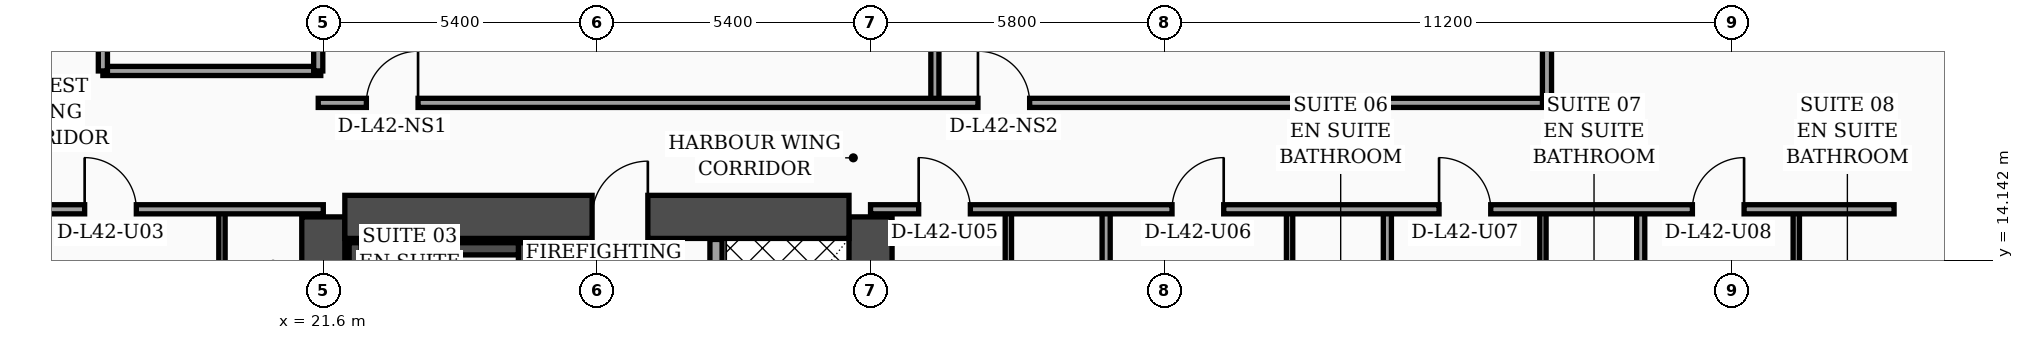
"""IFC4 building model, lengths in metres.
Left out: names, types, materials, properties, quantities, classifications, styles, units other than length and angle.
Written with IfcOpenShell. Run it as: python <this file> out.ifc"""

import sys

from ifc_helpers import new_model, si_unit, direction, frame, frame_2d, origin, place, context, subcontext, project, spatial, rectangle, extrude, element, fill, save


model = new_model("IFC4")
c1 = context("Model", 3, precision=1e-05, world=origin(), true_north=direction((0.0, 1.0)))
c2 = subcontext(c1, "Body", "Model", "MODEL_VIEW")
j1 = project(units=[si_unit("LENGTHUNIT", "METRE"), si_unit("PLANEANGLEUNIT", "RADIAN")], contexts=[c1])
p1 = place(None, origin())
s1 = spatial("IfcSite", under=j1, at=p1, CompositionType="ELEMENT")
p2 = place(p1, origin())
s2 = spatial("IfcBuilding", under=s1, at=p2, CompositionType="ELEMENT")
p3 = place(p2, frame((0.0, 0.0, 171.3)))
s3 = spatial("IfcBuildingStorey", under=s2, at=p3, CompositionType="ELEMENT", Elevation=171.3)
for number, where, z_axis, x_axis in (
    (1, (21.6, 4.6, 0.0), (0.0, 0.0, 1.0), (0.0, 1.0, 0.0)),
    (2, (32.4, 4.6, 0.0), (0.0, 0.0, 1.0), (0.0, 1.0, 0.0)),
):
    element("IfcWall", number, at=place(p3, frame(where, z_axis=z_axis, x_axis=x_axis)), inside=s3, PredefinedType="SHEAR", context=c2, shape_type="SweptSolid", body=[
        extrude(rectangle(XDim=10.4, YDim=0.85, at=frame_2d((5.2, 0.0))), origin(), (0.0, 0.0, 1.0), 3.56),
    ])
p4 = place(p3, frame((22.025, 15.0, 0.0), z_axis=(0.0, 0.0, 1.0), x_axis=(1.0, 0.0, 0.0)))
e3 = element("IfcWall", 3, at=p4, inside=s3, PredefinedType="SHEAR", context=c2, shape_type="SweptSolid", body=[
    extrude(rectangle(XDim=9.95, YDim=0.85, at=frame_2d((4.975, 0.0))), origin(), (0.0, 0.0, 1.0), 3.56),
])
p5 = place(p4, frame((4.88, 0.0, 0.0)))
e4 = element("IfcOpeningElement", 4, at=p5, cuts=e3, PredefinedType="OPENING", context=c2, shape_type="SweptSolid", body=[
    extrude(rectangle(XDim=1.1, YDim=2.2, at=frame_2d((0.55, 1.1))), frame((0.0, 0.435, 0.0), z_axis=(0.0, -1.0, 0.0), x_axis=(1.0, 0.0, 0.0)), (0.0, 0.0, 1.0), 0.87),
])
p6 = place(p3, frame((22.23, 5.025, 0.0), z_axis=(0.0, 0.0, 1.0), x_axis=(0.0, 1.0, 0.0)))
e5 = element("IfcWall", 5, at=p6, inside=s3, PredefinedType="SOLIDWALL", context=c2, shape_type="SweptSolid", body=[
    extrude(rectangle(XDim=9.465, YDim=0.24, at=frame_2d((4.732, 0.0))), origin(), (0.0, 0.0, 1.0), 3.56),
])
p7 = place(p3, frame((25.57, 5.025, 0.0), z_axis=(0.0, 0.0, 1.0), x_axis=(0.0, 1.0, 0.0)))
e6 = element("IfcWall", 6, at=p7, inside=s3, PredefinedType="SOLIDWALL", context=c2, shape_type="SweptSolid", body=[
    extrude(rectangle(XDim=9.465, YDim=0.24, at=frame_2d((4.732, 0.0))), origin(), (0.0, 0.0, 1.0), 3.56),
])
p8 = place(p7, frame((0.35, 0.0, 0.0)))
e7 = element("IfcOpeningElement", 7, at=p8, cuts=e6, PredefinedType="OPENING", context=c2, shape_type="SweptSolid", body=[
    extrude(rectangle(XDim=1.15, YDim=2.2, at=frame_2d((0.575, 1.1))), frame((0.0, 0.13, 0.0), z_axis=(0.0, -1.0, 0.0), x_axis=(1.0, 0.0, 0.0)), (0.0, 0.0, 1.0), 0.26),
])
p9 = place(p3, frame((22.35, 14.37, 0.0), z_axis=(0.0, 0.0, 1.0), x_axis=(1.0, 0.0, 0.0)))
e8 = element("IfcWall", 8, at=p9, inside=s3, PredefinedType="SOLIDWALL", context=c2, shape_type="SweptSolid", body=[
    extrude(rectangle(XDim=3.1, YDim=0.24, at=frame_2d((1.55, 0.0))), origin(), (0.0, 0.0, 1.0), 3.56),
])
p10 = place(p3, frame((59.23, 5.505, 0.0), z_axis=(0.0, 0.0, 1.0), x_axis=(-0.300509063924, 0.953778958931, 0.0)))
e9 = element("IfcWall", 9, at=p10, inside=s3, PredefinedType="SOLIDWALL", context=c2, shape_type="SweptSolid", body=[
    extrude(rectangle(XDim=30.814, YDim=0.32, at=frame_2d((15.407, 0.0))), origin(), (0.0, 0.0, 1.0), 3.56),
])
p11 = place(p10, frame((4.747, 0.0, 0.0)))
e10 = element("IfcOpeningElement", 10, at=p11, cuts=e9, PredefinedType="OPENING", context=c2, shape_type="SweptSolid", body=[
    extrude(rectangle(XDim=1.4, YDim=2.25, at=frame_2d((0.7, 1.125))), frame((0.0, 0.17, 0.0), z_axis=(0.0, -1.0, 0.0), x_axis=(1.0, 0.0, 0.0)), (0.0, 0.0, 1.0), 0.34),
])
p12 = place(p10, frame((1.6, 0.0, 0.75)))
e11 = element("IfcOpeningElement", 11, at=p12, cuts=e9, PredefinedType="OPENING", context=c2, shape_type="SweptSolid", body=[
    extrude(rectangle(XDim=1.5, YDim=1.6, at=frame_2d((0.75, 0.8))), frame((0.0, 0.17, 0.0), z_axis=(0.0, -1.0, 0.0), x_axis=(1.0, 0.0, 0.0)), (0.0, 0.0, 1.0), 0.34),
])
p13 = place(p10, frame((7.8, 0.0, 0.75)))
e12 = element("IfcOpeningElement", 12, at=p13, cuts=e9, PredefinedType="OPENING", context=c2, shape_type="SweptSolid", body=[
    extrude(rectangle(XDim=1.5, YDim=1.6, at=frame_2d((0.75, 0.8))), frame((0.0, 0.17, 0.0), z_axis=(0.0, -1.0, 0.0), x_axis=(1.0, 0.0, 0.0)), (0.0, 0.0, 1.0), 0.34),
])
p14 = place(p10, frame((10.9, 0.0, 0.75)))
e13 = element("IfcOpeningElement", 13, at=p14, cuts=e9, PredefinedType="OPENING", context=c2, shape_type="SweptSolid", body=[
    extrude(rectangle(XDim=1.5, YDim=1.6, at=frame_2d((0.75, 0.8))), frame((0.0, 0.17, 0.0), z_axis=(0.0, -1.0, 0.0), x_axis=(1.0, 0.0, 0.0)), (0.0, 0.0, 1.0), 0.34),
])
p15 = place(p10, frame((14.0, 0.0, 0.75)))
e14 = element("IfcOpeningElement", 14, at=p15, cuts=e9, PredefinedType="OPENING", context=c2, shape_type="SweptSolid", body=[
    extrude(rectangle(XDim=1.5, YDim=1.6, at=frame_2d((0.75, 0.8))), frame((0.0, 0.17, 0.0), z_axis=(0.0, -1.0, 0.0), x_axis=(1.0, 0.0, 0.0)), (0.0, 0.0, 1.0), 0.34),
])
p16 = place(p10, frame((17.1, 0.0, 0.75)))
e15 = element("IfcOpeningElement", 15, at=p16, cuts=e9, PredefinedType="OPENING", context=c2, shape_type="SweptSolid", body=[
    extrude(rectangle(XDim=1.5, YDim=1.6, at=frame_2d((0.75, 0.8))), frame((0.0, 0.17, 0.0), z_axis=(0.0, -1.0, 0.0), x_axis=(1.0, 0.0, 0.0)), (0.0, 0.0, 1.0), 0.34),
])
p17 = place(p10, frame((20.2, 0.0, 0.75)))
e16 = element("IfcOpeningElement", 16, at=p17, cuts=e9, PredefinedType="OPENING", context=c2, shape_type="SweptSolid", body=[
    extrude(rectangle(XDim=1.5, YDim=1.6, at=frame_2d((0.75, 0.8))), frame((0.0, 0.17, 0.0), z_axis=(0.0, -1.0, 0.0), x_axis=(1.0, 0.0, 0.0)), (0.0, 0.0, 1.0), 0.34),
])
p18 = place(p10, frame((23.3, 0.0, 0.75)))
e17 = element("IfcOpeningElement", 17, at=p18, cuts=e9, PredefinedType="OPENING", context=c2, shape_type="SweptSolid", body=[
    extrude(rectangle(XDim=1.5, YDim=1.6, at=frame_2d((0.75, 0.8))), frame((0.0, 0.17, 0.0), z_axis=(0.0, -1.0, 0.0), x_axis=(1.0, 0.0, 0.0)), (0.0, 0.0, 1.0), 0.34),
])
p19 = place(p10, frame((26.4, 0.0, 0.75)))
e18 = element("IfcOpeningElement", 18, at=p19, cuts=e9, PredefinedType="OPENING", context=c2, shape_type="SweptSolid", body=[
    extrude(rectangle(XDim=1.5, YDim=1.6, at=frame_2d((0.75, 0.8))), frame((0.0, 0.17, 0.0), z_axis=(0.0, -1.0, 0.0), x_axis=(1.0, 0.0, 0.0)), (0.0, 0.0, 1.0), 0.34),
])
p20 = place(p3, frame((29.35, 5.045, 0.0), z_axis=(0.0, 0.0, 1.0), x_axis=(0.0, 1.0, 0.0)))
e19 = element("IfcWall", 19, at=p20, inside=s3, PredefinedType="SOLIDWALL", context=c2, shape_type="SweptSolid", body=[
    extrude(rectangle(XDim=9.51, YDim=0.24, at=frame_2d((4.755, 0.0))), origin(), (0.0, 0.0, 1.0), 3.56),
])
p21 = place(p20, frame((0.55, 0.0, 0.0)))
e20 = element("IfcOpeningElement", 20, at=p21, cuts=e19, PredefinedType="OPENING", context=c2, shape_type="SweptSolid", body=[
    extrude(rectangle(XDim=1.3, YDim=2.35, at=frame_2d((0.65, 1.175))), frame((0.0, 0.13, 0.0), z_axis=(0.0, -1.0, 0.0), x_axis=(1.0, 0.0, 0.0)), (0.0, 0.0, 1.0), 0.26),
])
p22 = place(p3, frame((19.6, 2.44, 0.0), z_axis=(0.0, 0.0, 1.0), x_axis=(0.0, 1.0, 0.0)))
e21 = element("IfcWall", 21, at=p22, inside=s3, PredefinedType="PARTITIONING", context=c2, shape_type="SweptSolid", body=[
    extrude(rectangle(XDim=12.71, YDim=0.125, at=frame_2d((6.355, 0.0))), origin(), (0.0, 0.0, 1.0), 2.49),
])
p23 = place(p22, frame((4.34, 0.0, 0.0)))
e22 = element("IfcOpeningElement", 22, at=p23, cuts=e21, PredefinedType="OPENING", context=c2, shape_type="SweptSolid", body=[
    extrude(rectangle(XDim=0.96, YDim=2.2, at=frame_2d((0.48, 1.1))), frame((0.0, 0.073, 0.0), z_axis=(0.0, -1.0, 0.0), x_axis=(1.0, 0.0, 0.0)), (0.0, 0.0, 1.0), 0.145),
])
p24 = place(p22, frame((10.18, 0.0, 0.0)))
e23 = element("IfcOpeningElement", 23, at=p24, cuts=e21, PredefinedType="OPENING", context=c2, shape_type="SweptSolid", body=[
    extrude(rectangle(XDim=0.9, YDim=2.15, at=frame_2d((0.45, 1.075))), frame((0.0, 0.073, 0.0), z_axis=(0.0, -1.0, 0.0), x_axis=(1.0, 0.0, 0.0)), (0.0, 0.0, 1.0), 0.145),
])
p25 = place(p3, frame((15.15, 15.15, 0.0), z_axis=(0.0, 0.0, 1.0), x_axis=(1.0, 0.0, 0.0)))
e24 = element("IfcWall", 24, at=p25, inside=s3, PredefinedType="PARTITIONING", context=c2, shape_type="SweptSolid", body=[
    extrude(rectangle(XDim=6.45, YDim=0.18, at=frame_2d((3.225, 0.0))), origin(), (0.0, 0.0, 1.0), 2.49),
])
p26 = place(p25, frame((1.74, 0.0, 0.0)))
e25 = element("IfcOpeningElement", 25, at=p26, cuts=e24, PredefinedType="OPENING", context=c2, shape_type="SweptSolid", body=[
    extrude(rectangle(XDim=1.02, YDim=2.2, at=frame_2d((0.51, 1.1))), frame((0.0, 0.1, 0.0), z_axis=(0.0, -1.0, 0.0), x_axis=(1.0, 0.0, 0.0)), (0.0, 0.0, 1.0), 0.2),
])
p27 = place(p3, frame((17.25, 17.88, 0.0), z_axis=(0.0, 0.0, 1.0), x_axis=(1.0, 0.0, 0.0)))
e26 = element("IfcWall", 26, at=p27, inside=s3, PredefinedType="PARTITIONING", context=c2, shape_type="SweptSolid", body=[
    extrude(rectangle(XDim=4.3, YDim=0.18, at=frame_2d((2.15, 0.0))), origin(), (0.0, 0.0, 1.0), 3.09),
])
p28 = place(p3, frame((21.5, 17.88, 0.0), z_axis=(0.0, 0.0, 1.0), x_axis=(0.0, 1.0, 0.0)))
e27 = element("IfcWall", 27, at=p28, inside=s3, PredefinedType="PARTITIONING", context=c2, shape_type="SweptSolid", body=[
    extrude(rectangle(XDim=6.44, YDim=0.18, at=frame_2d((3.22, 0.0))), origin(), (0.0, 0.0, 1.0), 3.09),
])
p29 = place(p3, frame((17.25, 17.88, 0.0), z_axis=(0.0, 0.0, 1.0), x_axis=(0.0, 1.0, 0.0)))
e28 = element("IfcWall", 28, at=p29, inside=s3, PredefinedType="PARTITIONING", context=c2, shape_type="SweptSolid", body=[
    extrude(rectangle(XDim=6.44, YDim=0.18, at=frame_2d((3.22, 0.0))), origin(), (0.0, 0.0, 1.0), 3.09),
])
p30 = place(p29, frame((0.65, 0.0, 0.0)))
e29 = element("IfcOpeningElement", 29, at=p30, cuts=e28, PredefinedType="OPENING", context=c2, shape_type="SweptSolid", body=[
    extrude(rectangle(XDim=0.98, YDim=2.15, at=frame_2d((0.49, 1.075))), frame((0.0, 0.1, 0.0), z_axis=(0.0, -1.0, 0.0), x_axis=(1.0, 0.0, 0.0)), (0.0, 0.0, 1.0), 0.2),
])
p31 = place(p29, frame((3.27, 0.0, 0.0)))
e30 = element("IfcOpeningElement", 30, at=p31, cuts=e28, PredefinedType="OPENING", context=c2, shape_type="SweptSolid", body=[
    extrude(rectangle(XDim=0.96, YDim=2.2, at=frame_2d((0.48, 1.1))), frame((0.0, 0.1, 0.0), z_axis=(0.0, -1.0, 0.0), x_axis=(1.0, 0.0, 0.0)), (0.0, 0.0, 1.0), 0.2),
])
p32 = place(p3, frame((35.12, 2.44, 0.0), z_axis=(0.0, 0.0, 1.0), x_axis=(0.0, 1.0, 0.0)))
e31 = element("IfcWall", 31, at=p32, inside=s3, PredefinedType="PARTITIONING", context=c2, shape_type="SweptSolid", body=[
    extrude(rectangle(XDim=12.71, YDim=0.125, at=frame_2d((6.355, 0.0))), origin(), (0.0, 0.0, 1.0), 2.94),
])
p33 = place(p32, frame((4.35, 0.0, 0.0)))
e32 = element("IfcOpeningElement", 32, at=p33, cuts=e31, PredefinedType="OPENING", context=c2, shape_type="SweptSolid", body=[
    extrude(rectangle(XDim=0.96, YDim=2.2, at=frame_2d((0.48, 1.1))), frame((0.0, 0.073, 0.0), z_axis=(0.0, -1.0, 0.0), x_axis=(1.0, 0.0, 0.0)), (0.0, 0.0, 1.0), 0.145),
])
p34 = place(p32, frame((10.21, 0.0, 0.0)))
e33 = element("IfcOpeningElement", 33, at=p34, cuts=e31, PredefinedType="OPENING", context=c2, shape_type="SweptSolid", body=[
    extrude(rectangle(XDim=0.9, YDim=2.15, at=frame_2d((0.45, 1.075))), frame((0.0, 0.073, 0.0), z_axis=(0.0, -1.0, 0.0), x_axis=(1.0, 0.0, 0.0)), (0.0, 0.0, 1.0), 0.145),
])
p35 = place(p3, frame((40.67, 2.44, 0.0), z_axis=(0.0, 0.0, 1.0), x_axis=(0.0, 1.0, 0.0)))
e34 = element("IfcWall", 34, at=p35, inside=s3, PredefinedType="PARTITIONING", context=c2, shape_type="SweptSolid", body=[
    extrude(rectangle(XDim=12.71, YDim=0.125, at=frame_2d((6.355, 0.0))), origin(), (0.0, 0.0, 1.0), 2.94),
])
p36 = place(p35, frame((4.35, 0.0, 0.0)))
e35 = element("IfcOpeningElement", 35, at=p36, cuts=e34, PredefinedType="OPENING", context=c2, shape_type="SweptSolid", body=[
    extrude(rectangle(XDim=0.96, YDim=2.2, at=frame_2d((0.48, 1.1))), frame((0.0, 0.073, 0.0), z_axis=(0.0, -1.0, 0.0), x_axis=(1.0, 0.0, 0.0)), (0.0, 0.0, 1.0), 0.145),
])
p37 = place(p35, frame((10.21, 0.0, 0.0)))
e36 = element("IfcOpeningElement", 36, at=p37, cuts=e34, PredefinedType="OPENING", context=c2, shape_type="SweptSolid", body=[
    extrude(rectangle(XDim=0.9, YDim=2.15, at=frame_2d((0.45, 1.075))), frame((0.0, 0.073, 0.0), z_axis=(0.0, -1.0, 0.0), x_axis=(1.0, 0.0, 0.0)), (0.0, 0.0, 1.0), 0.145),
])
p38 = place(p3, frame((37.05, 2.44, 0.0), z_axis=(0.0, 0.0, 1.0), x_axis=(0.0, 1.0, 0.0)))
e37 = element("IfcWall", 37, at=p38, inside=s3, PredefinedType="PARTITIONING", context=c2, shape_type="SweptSolid", body=[
    extrude(rectangle(XDim=12.71, YDim=0.16, at=frame_2d((6.355, 0.0))), origin(), (0.0, 0.0, 1.0), 2.94),
])
p39 = place(p3, frame((45.67, 2.44, 0.0), z_axis=(0.0, 0.0, 1.0), x_axis=(0.0, 1.0, 0.0)))
e38 = element("IfcWall", 38, at=p39, inside=s3, PredefinedType="PARTITIONING", context=c2, shape_type="SweptSolid", body=[
    extrude(rectangle(XDim=12.71, YDim=0.125, at=frame_2d((6.355, 0.0))), origin(), (0.0, 0.0, 1.0), 3.04),
])
p40 = place(p39, frame((4.35, 0.0, 0.0)))
e39 = element("IfcOpeningElement", 39, at=p40, cuts=e38, PredefinedType="OPENING", context=c2, shape_type="SweptSolid", body=[
    extrude(rectangle(XDim=0.96, YDim=2.2, at=frame_2d((0.48, 1.1))), frame((0.0, 0.073, 0.0), z_axis=(0.0, -1.0, 0.0), x_axis=(1.0, 0.0, 0.0)), (0.0, 0.0, 1.0), 0.145),
])
p41 = place(p39, frame((10.21, 0.0, 0.0)))
e40 = element("IfcOpeningElement", 40, at=p41, cuts=e38, PredefinedType="OPENING", context=c2, shape_type="SweptSolid", body=[
    extrude(rectangle(XDim=0.9, YDim=2.15, at=frame_2d((0.45, 1.075))), frame((0.0, 0.073, 0.0), z_axis=(0.0, -1.0, 0.0), x_axis=(1.0, 0.0, 0.0)), (0.0, 0.0, 1.0), 0.145),
])
p42 = place(p3, frame((42.6, 2.44, 0.0), z_axis=(0.0, 0.0, 1.0), x_axis=(0.0, 1.0, 0.0)))
e41 = element("IfcWall", 41, at=p42, inside=s3, PredefinedType="PARTITIONING", context=c2, shape_type="SweptSolid", body=[
    extrude(rectangle(XDim=12.71, YDim=0.16, at=frame_2d((6.355, 0.0))), origin(), (0.0, 0.0, 1.0), 3.04),
])
p43 = place(p3, frame((50.67, 2.44, 0.0), z_axis=(0.0, 0.0, 1.0), x_axis=(0.0, 1.0, 0.0)))
e42 = element("IfcWall", 42, at=p43, inside=s3, PredefinedType="PARTITIONING", context=c2, shape_type="SweptSolid", body=[
    extrude(rectangle(XDim=12.71, YDim=0.125, at=frame_2d((6.355, 0.0))), origin(), (0.0, 0.0, 1.0), 3.04),
])
p44 = place(p43, frame((4.35, 0.0, 0.0)))
e43 = element("IfcOpeningElement", 43, at=p44, cuts=e42, PredefinedType="OPENING", context=c2, shape_type="SweptSolid", body=[
    extrude(rectangle(XDim=0.96, YDim=2.2, at=frame_2d((0.48, 1.1))), frame((0.0, 0.073, 0.0), z_axis=(0.0, -1.0, 0.0), x_axis=(1.0, 0.0, 0.0)), (0.0, 0.0, 1.0), 0.145),
])
p45 = place(p43, frame((10.21, 0.0, 0.0)))
e44 = element("IfcOpeningElement", 44, at=p45, cuts=e42, PredefinedType="OPENING", context=c2, shape_type="SweptSolid", body=[
    extrude(rectangle(XDim=0.9, YDim=2.15, at=frame_2d((0.45, 1.075))), frame((0.0, 0.073, 0.0), z_axis=(0.0, -1.0, 0.0), x_axis=(1.0, 0.0, 0.0)), (0.0, 0.0, 1.0), 0.145),
])
p46 = place(p3, frame((47.6, 2.44, 0.0), z_axis=(0.0, 0.0, 1.0), x_axis=(0.0, 1.0, 0.0)))
e45 = element("IfcWall", 45, at=p46, inside=s3, PredefinedType="PARTITIONING", context=c2, shape_type="SweptSolid", body=[
    extrude(rectangle(XDim=12.71, YDim=0.16, at=frame_2d((6.355, 0.0))), origin(), (0.0, 0.0, 1.0), 2.94),
])
p47 = place(p3, frame((32.4, 15.15, 0.0), z_axis=(0.0, 0.0, 1.0), x_axis=(1.0, 0.0, 0.0)))
e46 = element("IfcWall", 46, at=p47, inside=s3, PredefinedType="PARTITIONING", context=c2, shape_type="SweptSolid", body=[
    extrude(rectangle(XDim=20.2, YDim=0.18, at=frame_2d((10.1, 0.0))), origin(), (0.0, 0.0, 1.0), 2.94),
])
p48 = place(p47, frame((0.95, 0.0, 0.0)))
e47 = element("IfcOpeningElement", 47, at=p48, cuts=e46, PredefinedType="OPENING", context=c2, shape_type="SweptSolid", body=[
    extrude(rectangle(XDim=1.02, YDim=2.2, at=frame_2d((0.51, 1.1))), frame((0.0, 0.1, 0.0), z_axis=(0.0, -1.0, 0.0), x_axis=(1.0, 0.0, 0.0)), (0.0, 0.0, 1.0), 0.2),
])
p49 = place(p47, frame((5.95, 0.0, 0.0)))
e48 = element("IfcOpeningElement", 48, at=p49, cuts=e46, PredefinedType="OPENING", context=c2, shape_type="SweptSolid", body=[
    extrude(rectangle(XDim=1.02, YDim=2.2, at=frame_2d((0.51, 1.1))), frame((0.0, 0.1, 0.0), z_axis=(0.0, -1.0, 0.0), x_axis=(1.0, 0.0, 0.0)), (0.0, 0.0, 1.0), 0.2),
])
p50 = place(p47, frame((11.22, 0.0, 0.0)))
e49 = element("IfcOpeningElement", 49, at=p50, cuts=e46, PredefinedType="OPENING", context=c2, shape_type="SweptSolid", body=[
    extrude(rectangle(XDim=1.02, YDim=2.2, at=frame_2d((0.51, 1.1))), frame((0.0, 0.1, 0.0), z_axis=(0.0, -1.0, 0.0), x_axis=(1.0, 0.0, 0.0)), (0.0, 0.0, 1.0), 0.2),
])
p51 = place(p47, frame((16.22, 0.0, 0.0)))
e50 = element("IfcOpeningElement", 50, at=p51, cuts=e46, PredefinedType="OPENING", context=c2, shape_type="SweptSolid", body=[
    extrude(rectangle(XDim=1.02, YDim=2.2, at=frame_2d((0.51, 1.1))), frame((0.0, 0.1, 0.0), z_axis=(0.0, -1.0, 0.0), x_axis=(1.0, 0.0, 0.0)), (0.0, 0.0, 1.0), 0.2),
])
p52 = place(p3, frame((33.67, 17.25, 0.0), z_axis=(0.0, 0.0, 1.0), x_axis=(0.0, 1.0, 0.0)))
e51 = element("IfcWall", 51, at=p52, inside=s3, PredefinedType="PARTITIONING", context=c2, shape_type="SweptSolid", body=[
    extrude(rectangle(XDim=13.96, YDim=0.16, at=frame_2d((6.98, 0.0))), origin(), (0.0, 0.0, 1.0), 2.94),
])
p53 = place(p3, frame((21.5, 17.25, 0.0), z_axis=(0.0, 0.0, 1.0), x_axis=(1.0, 0.0, 0.0)))
e52 = element("IfcWall", 52, at=p53, inside=s3, PredefinedType="PARTITIONING", context=c2, shape_type="SweptSolid", body=[
    extrude(rectangle(XDim=24.25, YDim=0.18, at=frame_2d((12.125, 0.0))), origin(), (0.0, 0.0, 1.0), 2.94),
])
p54 = place(p53, frame((0.95, 0.0, 0.0)))
e53 = element("IfcOpeningElement", 53, at=p54, cuts=e52, PredefinedType="OPENING", context=c2, shape_type="SweptSolid", body=[
    extrude(rectangle(XDim=1.02, YDim=2.2, at=frame_2d((0.51, 1.1))), frame((0.0, 0.1, 0.0), z_axis=(0.0, -1.0, 0.0), x_axis=(1.0, 0.0, 0.0)), (0.0, 0.0, 1.0), 0.2),
])
p55 = place(p53, frame((13.02, 0.0, 0.0)))
e54 = element("IfcOpeningElement", 54, at=p55, cuts=e52, PredefinedType="OPENING", context=c2, shape_type="SweptSolid", body=[
    extrude(rectangle(XDim=1.02, YDim=2.2, at=frame_2d((0.51, 1.1))), frame((0.0, 0.1, 0.0), z_axis=(0.0, -1.0, 0.0), x_axis=(1.0, 0.0, 0.0)), (0.0, 0.0, 1.0), 0.2),
])
p56 = place(p3, frame((45.75, 17.25, 0.0), z_axis=(0.0, 0.0, 1.0), x_axis=(0.0, 1.0, 0.0)))
e55 = element("IfcWall", 55, at=p56, inside=s3, PredefinedType="PARTITIONING", context=c2, shape_type="SweptSolid", body=[
    extrude(rectangle(XDim=20.69, YDim=0.18, at=frame_2d((10.345, 0.0))), origin(), (0.0, 0.0, 1.0), 2.94),
])
p57 = place(p26, origin())
e56 = element("IfcDoor", 56, at=p57, inside=s3, OperationType="SINGLE_SWING_LEFT", PredefinedType="DOOR", context=c2, shape_type="SweptSolid", body=[
    extrude(rectangle(XDim=1.02, YDim=2.2, at=frame_2d((0.51, 1.1))), frame((0.0, 0.025, 0.0), z_axis=(0.0, -1.0, 0.0), x_axis=(1.0, 0.0, 0.0)), (0.0, 0.0, 1.0), 0.05),
])
fill(e25, e56)
p58 = place(p48, origin())
e57 = element("IfcDoor", 57, at=p58, inside=s3, OperationType="SINGLE_SWING_LEFT", PredefinedType="DOOR", context=c2, shape_type="SweptSolid", body=[
    extrude(rectangle(XDim=1.02, YDim=2.2, at=frame_2d((0.51, 1.1))), frame((0.0, 0.025, 0.0), z_axis=(0.0, -1.0, 0.0), x_axis=(1.0, 0.0, 0.0)), (0.0, 0.0, 1.0), 0.05),
])
fill(e47, e57)
p59 = place(p49, origin())
e58 = element("IfcDoor", 58, at=p59, inside=s3, OperationType="SINGLE_SWING_RIGHT", PredefinedType="DOOR", context=c2, shape_type="SweptSolid", body=[
    extrude(rectangle(XDim=1.02, YDim=2.2, at=frame_2d((0.51, 1.1))), frame((0.0, 0.025, 0.0), z_axis=(0.0, -1.0, 0.0), x_axis=(1.0, 0.0, 0.0)), (0.0, 0.0, 1.0), 0.05),
])
fill(e48, e58)
p60 = place(p50, origin())
e59 = element("IfcDoor", 59, at=p60, inside=s3, OperationType="SINGLE_SWING_LEFT", PredefinedType="DOOR", context=c2, shape_type="SweptSolid", body=[
    extrude(rectangle(XDim=1.02, YDim=2.2, at=frame_2d((0.51, 1.1))), frame((0.0, 0.025, 0.0), z_axis=(0.0, -1.0, 0.0), x_axis=(1.0, 0.0, 0.0)), (0.0, 0.0, 1.0), 0.05),
])
fill(e49, e59)
p61 = place(p51, origin())
e60 = element("IfcDoor", 60, at=p61, inside=s3, OperationType="SINGLE_SWING_RIGHT", PredefinedType="DOOR", context=c2, shape_type="SweptSolid", body=[
    extrude(rectangle(XDim=1.02, YDim=2.2, at=frame_2d((0.51, 1.1))), frame((0.0, 0.025, 0.0), z_axis=(0.0, -1.0, 0.0), x_axis=(1.0, 0.0, 0.0)), (0.0, 0.0, 1.0), 0.05),
])
fill(e50, e60)
p62 = place(p54, origin())
e61 = element("IfcDoor", 61, at=p62, inside=s3, OperationType="SINGLE_SWING_RIGHT", PredefinedType="DOOR", context=c2, shape_type="SweptSolid", body=[
    extrude(rectangle(XDim=1.02, YDim=2.2, at=frame_2d((0.51, 1.1))), frame((0.0, 0.025, 0.0), z_axis=(0.0, -1.0, 0.0), x_axis=(1.0, 0.0, 0.0)), (0.0, 0.0, 1.0), 0.05),
])
fill(e53, e61)
p63 = place(p55, origin())
e62 = element("IfcDoor", 62, at=p63, inside=s3, OperationType="SINGLE_SWING_LEFT", PredefinedType="DOOR", context=c2, shape_type="SweptSolid", body=[
    extrude(rectangle(XDim=1.02, YDim=2.2, at=frame_2d((0.51, 1.1))), frame((0.0, 0.025, 0.0), z_axis=(0.0, -1.0, 0.0), x_axis=(1.0, 0.0, 0.0)), (0.0, 0.0, 1.0), 0.05),
])
fill(e54, e62)
p64 = place(p5, origin())
e63 = element("IfcDoor", 63, at=p64, inside=s3, OperationType="SINGLE_SWING_RIGHT", PredefinedType="DOOR", context=c2, shape_type="SweptSolid", body=[
    extrude(rectangle(XDim=1.1, YDim=2.2, at=frame_2d((0.55, 1.1))), frame((0.0, 0.025, 0.0), z_axis=(0.0, -1.0, 0.0), x_axis=(1.0, 0.0, 0.0)), (0.0, 0.0, 1.0), 0.05),
])
fill(e4, e63)
save(model, sys.argv[1])
